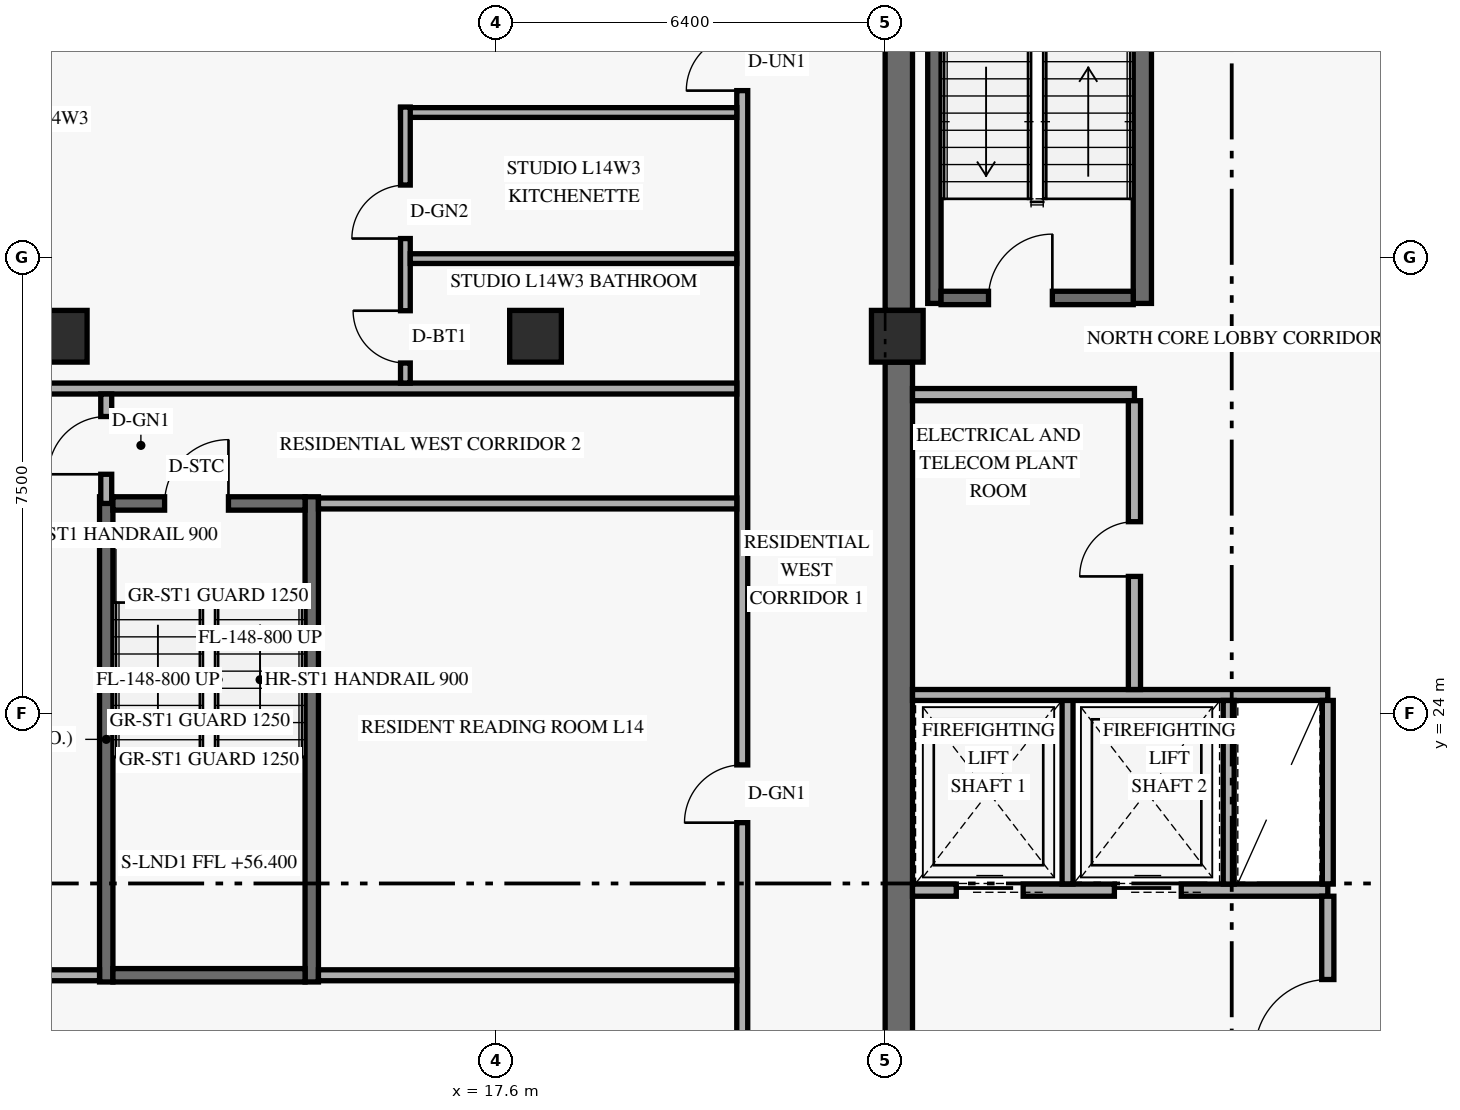
"""IFC4 building model, lengths in metres.
Left out: names, types, materials, properties, quantities, classifications, styles, units other than length and angle.
Written with IfcOpenShell. Run it as: python <this file> out.ifc"""

import sys

from ifc_helpers import new_model, si_unit, direction, frame, frame_2d, origin, origin_2d, place, context, subcontext, project, spatial, rectangle, extrude, element, fill, save


model = new_model("IFC4")
c1 = context("Model", 3, precision=1e-05, world=origin(), true_north=direction((0.0, 1.0)))
c2 = subcontext(c1, "Body", "Model", "MODEL_VIEW")
j1 = project(units=[si_unit("LENGTHUNIT", "METRE"), si_unit("PLANEANGLEUNIT", "RADIAN")], contexts=[c1])
p1 = place(None, origin())
s1 = spatial("IfcSite", under=j1, at=p1, CompositionType="ELEMENT")
p2 = place(p1, origin())
s2 = spatial("IfcBuilding", under=s1, at=p2, CompositionType="ELEMENT")
p3 = place(p2, frame((0.0, 0.0, 56.4)))
s3 = spatial("IfcBuildingStorey", under=s2, at=p3, CompositionType="ELEMENT", Elevation=56.4)
p4 = place(p3, frame((24.225, 17.975, 0.0), z_axis=(0.0, 0.0, 1.0), x_axis=(0.0, 1.0, 0.0)))
e1 = element("IfcWall", 1, at=p4, inside=s3, PredefinedType="SHEAR", context=c2, shape_type="SweptSolid", body=[
    extrude(rectangle(XDim=11.8, YDim=0.45, at=frame_2d((5.9, 0.0))), origin(), (0.0, 0.0, 1.0), 2.657),
])
p5 = place(p3, frame((24.225, 30.625, 0.0), z_axis=(0.0, 0.0, 1.0), x_axis=(0.0, 1.0, 0.0)))
e2 = element("IfcWall", 2, at=p5, inside=s3, PredefinedType="SHEAR", context=c2, shape_type="SweptSolid", body=[
    extrude(rectangle(XDim=7.7, YDim=0.45, at=frame_2d((3.85, 0.0))), origin(), (0.0, 0.0, 1.0), 2.657),
])
p6 = place(p3, frame((24.81, 30.74, 0.0), z_axis=(0.0, 0.0, 1.0), x_axis=(0.0, 1.0, 0.0)))
e3 = element("IfcWall", 3, at=p6, inside=s3, PredefinedType="SHEAR", context=c2, shape_type="SweptSolid", body=[
    extrude(rectangle(XDim=7.76, YDim=0.22, at=frame_2d((3.88, 0.0))), origin(), (0.0, 0.0, 1.0), 3.35),
])
p7 = place(p3, frame((28.23, 30.74, 0.0), z_axis=(0.0, 0.0, 1.0), x_axis=(0.0, 1.0, 0.0)))
e4 = element("IfcWall", 4, at=p7, inside=s3, PredefinedType="SHEAR", context=c2, shape_type="SweptSolid", body=[
    extrude(rectangle(XDim=7.76, YDim=0.3, at=frame_2d((3.88, 0.0))), origin(), (0.0, 0.0, 1.0), 3.35),
])
p8 = place(p3, frame((24.92, 30.83, 0.0), z_axis=(0.0, 0.0, 1.0), x_axis=(1.0, 0.0, 0.0)))
e5 = element("IfcWall", 5, at=p8, inside=s3, PredefinedType="SHEAR", context=c2, shape_type="SweptSolid", body=[
    extrude(rectangle(XDim=3.16, YDim=0.22, at=frame_2d((1.58, 0.0))), origin(), (0.0, 0.0, 1.0), 3.35),
])
p9 = place(p8, frame((0.78, 0.0, 0.0)))
e6 = element("IfcOpeningElement", 6, at=p9, cuts=e5, PredefinedType="OPENING", context=c2, shape_type="SweptSolid", body=[
    extrude(rectangle(XDim=1.05, YDim=2.15, at=frame_2d((0.525, 1.075))), frame((0.0, 0.12, 0.0), z_axis=(0.0, -1.0, 0.0), x_axis=(1.0, 0.0, 0.0)), (0.0, 0.0, 1.0), 0.24),
])
for number, where, z_axis, x_axis in (
    (7, (11.19, 19.58, 0.0), (0.0, 0.0, 1.0), (0.0, 1.0, 0.0)),
    (8, (14.57, 19.58, 0.0), (0.0, 0.0, 1.0), (0.0, 1.0, 0.0)),
):
    element("IfcWall", number, at=place(p3, frame(where, z_axis=z_axis, x_axis=x_axis)), inside=s3, PredefinedType="SHEAR", context=c2, shape_type="SweptSolid", body=[
        extrude(rectangle(XDim=7.98, YDim=0.22, at=frame_2d((3.99, 0.0))), origin(), (0.0, 0.0, 1.0), 2.657),
    ])
p10 = place(p3, frame((11.3, 19.69, 0.0), z_axis=(0.0, 0.0, 1.0), x_axis=(1.0, 0.0, 0.0)))
e9 = element("IfcWall", 9, at=p10, inside=s3, PredefinedType="SHEAR", context=c2, shape_type="SweptSolid", body=[
    extrude(rectangle(XDim=3.16, YDim=0.22, at=frame_2d((1.58, 0.0))), origin(), (0.0, 0.0, 1.0), 2.657),
])
p11 = place(p3, frame((11.3, 27.45, 0.0), z_axis=(0.0, 0.0, 1.0), x_axis=(1.0, 0.0, 0.0)))
e10 = element("IfcWall", 10, at=p11, inside=s3, PredefinedType="SHEAR", context=c2, shape_type="SweptSolid", body=[
    extrude(rectangle(XDim=3.16, YDim=0.22, at=frame_2d((1.58, 0.0))), origin(), (0.0, 0.0, 1.0), 2.657),
])
p12 = place(p11, frame((0.85, 0.0, 0.0)))
e11 = element("IfcOpeningElement", 11, at=p12, cuts=e10, PredefinedType="OPENING", context=c2, shape_type="SweptSolid", body=[
    extrude(rectangle(XDim=1.05, YDim=2.15, at=frame_2d((0.525, 1.075))), frame((0.0, 0.12, 0.0), z_axis=(0.0, -1.0, 0.0), x_axis=(1.0, 0.0, 0.0)), (0.0, 0.0, 1.0), 0.24),
])
for number, where, z_axis, x_axis in (
    (12, (10.45, 30.2, 0.0), (0.0, 0.0, 1.0), (1.0, 0.0, 0.0)),
    (13, (18.25, 30.2, 0.0), (0.0, 0.0, 1.0), (1.0, 0.0, 0.0)),
    (14, (24.2, 30.2, 0.0), (0.0, 0.0, 1.0), (1.0, 0.0, 0.0)),
):
    element("IfcColumn", number, at=place(p3, frame(where, z_axis=z_axis, x_axis=x_axis)), inside=s3, PredefinedType="COLUMN", context=c2, shape_type="SweptSolid", body=[
        extrude(rectangle(XDim=0.85, YDim=0.85, at=origin_2d()), origin(), (0.0, 0.0, 1.0), 3.6),
    ])
p13 = place(p3, frame((24.45, 21.09, 0.0), z_axis=(0.0, 0.0, 1.0), x_axis=(1.0, 0.0, 0.0)))
e15 = element("IfcWall", 15, at=p13, inside=s3, PredefinedType="STANDARD", context=c2, shape_type="SweptSolid", body=[
    extrude(rectangle(XDim=6.83, YDim=0.2, at=frame_2d((3.415, 0.0))), origin(), (0.0, 0.0, 1.0), 3.35),
])
p14 = place(p13, frame((0.72, 0.0, 0.0)))
e16 = element("IfcOpeningElement", 16, at=p14, cuts=e15, PredefinedType="OPENING", context=c2, shape_type="SweptSolid", body=[
    extrude(rectangle(XDim=1.1, YDim=2.2, at=frame_2d((0.55, 1.1))), frame((0.0, 0.11, 0.0), z_axis=(0.0, -1.0, 0.0), x_axis=(1.0, 0.0, 0.0)), (0.0, 0.0, 1.0), 0.22),
])
p15 = place(p13, frame((3.32, 0.0, 0.0)))
e17 = element("IfcOpeningElement", 17, at=p15, cuts=e15, PredefinedType="OPENING", context=c2, shape_type="SweptSolid", body=[
    extrude(rectangle(XDim=1.1, YDim=2.2, at=frame_2d((0.55, 1.1))), frame((0.0, 0.11, 0.0), z_axis=(0.0, -1.0, 0.0), x_axis=(1.0, 0.0, 0.0)), (0.0, 0.0, 1.0), 0.22),
])
p16 = place(p3, frame((31.28, 17.07, 0.0), z_axis=(0.0, 0.0, 1.0), x_axis=(0.0, 1.0, 0.0)))
e18 = element("IfcWall", 18, at=p16, inside=s3, PredefinedType="STANDARD", context=c2, shape_type="SweptSolid", body=[
    extrude(rectangle(XDim=3.92, YDim=0.2, at=frame_2d((1.96, 0.0))), origin(), (0.0, 0.0, 1.0), 2.639),
])
p17 = place(p16, frame((1.35, 0.0, 0.0)))
e19 = element("IfcOpeningElement", 19, at=p17, cuts=e18, PredefinedType="OPENING", context=c2, shape_type="SweptSolid", body=[
    extrude(rectangle(XDim=1.2, YDim=2.15, at=frame_2d((0.6, 1.075))), frame((0.0, 0.11, 0.0), z_axis=(0.0, -1.0, 0.0), x_axis=(1.0, 0.0, 0.0)), (0.0, 0.0, 1.0), 0.22),
])
p18 = place(p3, frame((27.0, 21.19, 0.0), z_axis=(0.0, 0.0, 1.0), x_axis=(0.0, 1.0, 0.0)))
e20 = element("IfcWall", 20, at=p18, inside=s3, PredefinedType="STANDARD", context=c2, shape_type="SweptSolid", body=[
    extrude(rectangle(XDim=3.11, YDim=0.18, at=frame_2d((1.555, 0.0))), origin(), (0.0, 0.0, 1.0), 3.35),
])
p19 = place(p3, frame((24.45, 24.3, 0.0), z_axis=(0.0, 0.0, 1.0), x_axis=(1.0, 0.0, 0.0)))
e21 = element("IfcWall", 21, at=p19, inside=s3, PredefinedType="STANDARD", context=c2, shape_type="SweptSolid", body=[
    extrude(rectangle(XDim=6.83, YDim=0.18, at=frame_2d((3.415, 0.0))), origin(), (0.0, 0.0, 1.0), 3.35),
])
for number, where, z_axis, x_axis in (
    (22, (29.65, 21.19, 0.0), (0.0, 0.0, 1.0), (0.0, 1.0, 0.0)),
    (23, (31.28, 21.19, 0.0), (0.0, 0.0, 1.0), (0.0, 1.0, 0.0)),
):
    element("IfcWall", number, at=place(p3, frame(where, z_axis=z_axis, x_axis=x_axis)), inside=s3, PredefinedType="STANDARD", context=c2, shape_type="SweptSolid", body=[
        extrude(rectangle(XDim=3.02, YDim=0.18, at=frame_2d((1.51, 0.0))), origin(), (0.0, 0.0, 1.0), 3.35),
    ])
p20 = place(p3, frame((24.45, 29.24, 0.0), z_axis=(0.0, 0.0, 1.0), x_axis=(1.0, 0.0, 0.0)))
e24 = element("IfcWall", 24, at=p20, inside=s3, PredefinedType="STANDARD", context=c2, shape_type="SweptSolid", body=[
    extrude(rectangle(XDim=3.65, YDim=0.2, at=frame_2d((1.825, 0.0))), origin(), (0.0, 0.0, 1.0), 3.35),
])
p21 = place(p3, frame((28.1, 24.39, 0.0), z_axis=(0.0, 0.0, 1.0), x_axis=(0.0, 1.0, 0.0)))
e25 = element("IfcWall", 25, at=p21, inside=s3, PredefinedType="STANDARD", context=c2, shape_type="SweptSolid", body=[
    extrude(rectangle(XDim=4.75, YDim=0.2, at=frame_2d((2.375, 0.0))), origin(), (0.0, 0.0, 1.0), 3.35),
])
p22 = place(p21, frame((1.86, 0.0, 0.0)))
e26 = element("IfcOpeningElement", 26, at=p22, cuts=e25, PredefinedType="OPENING", context=c2, shape_type="SweptSolid", body=[
    extrude(rectangle(XDim=0.9, YDim=2.1, at=frame_2d((0.45, 1.05))), frame((0.0, 0.11, 0.0), z_axis=(0.0, -1.0, 0.0), x_axis=(1.0, 0.0, 0.0)), (0.0, 0.0, 1.0), 0.22),
])
p23 = place(p3, frame((21.65, 1.29, 0.0), z_axis=(0.0, 0.0, 1.0), x_axis=(0.0, 1.0, 0.0)))
e27 = element("IfcWall", 27, at=p23, inside=s3, PredefinedType="STANDARD", context=c2, shape_type="SweptSolid", body=[
    extrude(rectangle(XDim=45.42, YDim=0.18, at=frame_2d((22.71, 0.0))), origin(), (0.0, 0.0, 1.0), 2.639),
])
p24 = place(p23, frame((3.135, 0.0, 0.0)))
e28 = element("IfcOpeningElement", 28, at=p24, cuts=e27, PredefinedType="OPENING", context=c2, shape_type="SweptSolid", body=[
    extrude(rectangle(XDim=0.92, YDim=2.15, at=frame_2d((0.46, 1.075))), frame((0.0, 0.1, 0.0), z_axis=(0.0, -1.0, 0.0), x_axis=(1.0, 0.0, 0.0)), (0.0, 0.0, 1.0), 0.2),
])
p25 = place(p23, frame((13.975, 0.0, 0.0)))
e29 = element("IfcOpeningElement", 29, at=p25, cuts=e27, PredefinedType="OPENING", context=c2, shape_type="SweptSolid", body=[
    extrude(rectangle(XDim=0.92, YDim=2.15, at=frame_2d((0.46, 1.075))), frame((0.0, 0.1, 0.0), z_axis=(0.0, -1.0, 0.0), x_axis=(1.0, 0.0, 0.0)), (0.0, 0.0, 1.0), 0.2),
])
p26 = place(p23, frame((20.91, 0.0, 0.0)))
e30 = element("IfcOpeningElement", 30, at=p26, cuts=e27, PredefinedType="OPENING", context=c2, shape_type="SweptSolid", body=[
    extrude(rectangle(XDim=0.95, YDim=2.15, at=frame_2d((0.475, 1.075))), frame((0.0, 0.1, 0.0), z_axis=(0.0, -1.0, 0.0), x_axis=(1.0, 0.0, 0.0)), (0.0, 0.0, 1.0), 0.2),
])
p27 = place(p23, frame((32.95, 0.0, 0.0)))
e31 = element("IfcOpeningElement", 31, at=p27, cuts=e27, PredefinedType="OPENING", context=c2, shape_type="SweptSolid", body=[
    extrude(rectangle(XDim=0.92, YDim=2.15, at=frame_2d((0.46, 1.075))), frame((0.0, 0.1, 0.0), z_axis=(0.0, -1.0, 0.0), x_axis=(1.0, 0.0, 0.0)), (0.0, 0.0, 1.0), 0.2),
])
p28 = place(p23, frame((41.85, 0.0, 0.0)))
e32 = element("IfcOpeningElement", 32, at=p28, cuts=e27, PredefinedType="OPENING", context=c2, shape_type="SweptSolid", body=[
    extrude(rectangle(XDim=0.92, YDim=2.15, at=frame_2d((0.46, 1.075))), frame((0.0, 0.1, 0.0), z_axis=(0.0, -1.0, 0.0), x_axis=(1.0, 0.0, 0.0)), (0.0, 0.0, 1.0), 0.2),
])
p29 = place(p3, frame((14.68, 27.45, 0.0), z_axis=(0.0, 0.0, 1.0), x_axis=(1.0, 0.0, 0.0)))
e33 = element("IfcWall", 33, at=p29, inside=s3, PredefinedType="STANDARD", context=c2, shape_type="SweptSolid", body=[
    extrude(rectangle(XDim=6.88, YDim=0.18, at=frame_2d((3.44, 0.0))), origin(), (0.0, 0.0, 1.0), 2.639),
])
p30 = place(p3, frame((2.09, 29.34, 0.0), z_axis=(0.0, 0.0, 1.0), x_axis=(1.0, 0.0, 0.0)))
e34 = element("IfcWall", 34, at=p30, inside=s3, PredefinedType="STANDARD", context=c2, shape_type="SweptSolid", body=[
    extrude(rectangle(XDim=19.47, YDim=0.18, at=frame_2d((9.735, 0.0))), origin(), (0.0, 0.0, 1.0), 2.639),
])
p31 = place(p3, frame((11.19, 27.45, 0.0), z_axis=(0.0, 0.0, 1.0), x_axis=(0.0, 1.0, 0.0)))
e35 = element("IfcWall", 35, at=p31, inside=s3, PredefinedType="STANDARD", context=c2, shape_type="SweptSolid", body=[
    extrude(rectangle(XDim=1.8, YDim=0.18, at=frame_2d((0.9, 0.0))), origin(), (0.0, 0.0, 1.0), 2.639),
])
p32 = place(p31, frame((0.48, 0.0, 0.0)))
e36 = element("IfcOpeningElement", 36, at=p32, cuts=e35, PredefinedType="OPENING", context=c2, shape_type="SweptSolid", body=[
    extrude(rectangle(XDim=0.95, YDim=2.15, at=frame_2d((0.475, 1.075))), frame((0.0, 0.1, 0.0), z_axis=(0.0, -1.0, 0.0), x_axis=(1.0, 0.0, 0.0)), (0.0, 0.0, 1.0), 0.2),
])
p33 = place(p3, frame((2.09, 19.69, 0.0), z_axis=(0.0, 0.0, 1.0), x_axis=(1.0, 0.0, 0.0)))
e37 = element("IfcWall", 37, at=p33, inside=s3, PredefinedType="PARTITIONING", context=c2, shape_type="SweptSolid", body=[
    extrude(rectangle(XDim=8.99, YDim=0.18, at=frame_2d((4.495, 0.0))), origin(), (0.0, 0.0, 1.0), 2.639),
])
p34 = place(p3, frame((14.68, 19.69, 0.0), z_axis=(0.0, 0.0, 1.0), x_axis=(1.0, 0.0, 0.0)))
e38 = element("IfcWall", 38, at=p34, inside=s3, PredefinedType="PARTITIONING", context=c2, shape_type="SweptSolid", body=[
    extrude(rectangle(XDim=6.88, YDim=0.18, at=frame_2d((3.44, 0.0))), origin(), (0.0, 0.0, 1.0), 2.639),
])
p35 = place(p3, frame((16.03, 33.88, 0.0), z_axis=(0.0, 0.0, 1.0), x_axis=(1.0, 0.0, 0.0)))
e39 = element("IfcWall", 39, at=p35, inside=s3, PredefinedType="PLUMBINGWALL", context=c2, shape_type="SweptSolid", body=[
    extrude(rectangle(XDim=5.53, YDim=0.16, at=frame_2d((2.765, 0.0))), origin(), (0.0, 0.0, 1.0), 2.639),
])
p36 = place(p3, frame((16.11, 29.43, 0.0), z_axis=(0.0, 0.0, 1.0), x_axis=(0.0, 1.0, 0.0)))
e40 = element("IfcWall", 40, at=p36, inside=s3, PredefinedType="PLUMBINGWALL", context=c2, shape_type="SweptSolid", body=[
    extrude(rectangle(XDim=4.54, YDim=0.16, at=frame_2d((2.27, 0.0))), origin(), (0.0, 0.0, 1.0), 2.639),
])
p37 = place(p36, frame((0.33, 0.0, 0.0)))
e41 = element("IfcOpeningElement", 41, at=p37, cuts=e40, PredefinedType="OPENING", context=c2, shape_type="SweptSolid", body=[
    extrude(rectangle(XDim=0.86, YDim=2.12, at=frame_2d((0.43, 1.06))), frame((0.0, 0.09, 0.0), z_axis=(0.0, -1.0, 0.0), x_axis=(1.0, 0.0, 0.0)), (0.0, 0.0, 1.0), 0.18),
])
p38 = place(p36, frame((2.377, 0.0, 0.0)))
e42 = element("IfcOpeningElement", 42, at=p38, cuts=e40, PredefinedType="OPENING", context=c2, shape_type="SweptSolid", body=[
    extrude(rectangle(XDim=0.88, YDim=2.12, at=frame_2d((0.44, 1.06))), frame((0.0, 0.09, 0.0), z_axis=(0.0, -1.0, 0.0), x_axis=(1.0, 0.0, 0.0)), (0.0, 0.0, 1.0), 0.18),
])
p39 = place(p3, frame((16.19, 31.477, 0.0), z_axis=(0.0, 0.0, 1.0), x_axis=(1.0, 0.0, 0.0)))
e43 = element("IfcWall", 43, at=p39, inside=s3, PredefinedType="PLUMBINGWALL", context=c2, shape_type="SweptSolid", body=[
    extrude(rectangle(XDim=5.37, YDim=0.16, at=frame_2d((2.685, 0.0))), origin(), (0.0, 0.0, 1.0), 2.639),
])
p40 = place(p9, origin())
e44 = element("IfcDoor", 44, at=p40, inside=s3, OperationType="SINGLE_SWING_RIGHT", PredefinedType="DOOR", context=c2, shape_type="SweptSolid", body=[
    extrude(rectangle(XDim=1.05, YDim=2.15, at=frame_2d((0.525, 1.075))), frame((0.0, 0.025, 0.0), z_axis=(0.0, -1.0, 0.0), x_axis=(1.0, 0.0, 0.0)), (0.0, 0.0, 1.0), 0.05),
])
fill(e6, e44)
p41 = place(p14, origin())
e45 = element("IfcDoor", 45, at=p41, inside=s3, OperationType="SLIDING_TO_LEFT", PredefinedType="DOOR", context=c2, shape_type="SweptSolid", body=[
    extrude(rectangle(XDim=1.1, YDim=2.2, at=frame_2d((0.55, 1.1))), frame((0.0, 0.025, 0.0), z_axis=(0.0, -1.0, 0.0), x_axis=(1.0, 0.0, 0.0)), (0.0, 0.0, 1.0), 0.05),
])
fill(e16, e45)
p42 = place(p15, origin())
e46 = element("IfcDoor", 46, at=p42, inside=s3, OperationType="SLIDING_TO_LEFT", PredefinedType="DOOR", context=c2, shape_type="SweptSolid", body=[
    extrude(rectangle(XDim=1.1, YDim=2.2, at=frame_2d((0.55, 1.1))), frame((0.0, 0.025, 0.0), z_axis=(0.0, -1.0, 0.0), x_axis=(1.0, 0.0, 0.0)), (0.0, 0.0, 1.0), 0.05),
])
fill(e17, e46)
p43 = place(p17, origin())
e47 = element("IfcDoor", 47, at=p43, inside=s3, OperationType="SINGLE_SWING_LEFT", PredefinedType="DOOR", context=c2, shape_type="SweptSolid", body=[
    extrude(rectangle(XDim=1.2, YDim=2.15, at=frame_2d((0.6, 1.075))), frame((0.0, 0.025, 0.0), z_axis=(0.0, -1.0, 0.0), x_axis=(1.0, 0.0, 0.0)), (0.0, 0.0, 1.0), 0.05),
])
fill(e19, e47)
p44 = place(p22, origin())
e48 = element("IfcDoor", 48, at=p44, inside=s3, OperationType="SINGLE_SWING_LEFT", PredefinedType="DOOR", context=c2, shape_type="SweptSolid", body=[
    extrude(rectangle(XDim=0.9, YDim=2.1, at=frame_2d((0.45, 1.05))), frame((0.0, 0.025, 0.0), z_axis=(0.0, -1.0, 0.0), x_axis=(1.0, 0.0, 0.0)), (0.0, 0.0, 1.0), 0.05),
])
fill(e26, e48)
p45 = place(p12, frame((1.05, 0.0, 0.0), z_axis=(0.0, 0.0, 1.0), x_axis=(-1.0, 0.0, 0.0)))
e49 = element("IfcDoor", 49, at=p45, inside=s3, OperationType="SINGLE_SWING_LEFT", PredefinedType="DOOR", context=c2, shape_type="SweptSolid", body=[
    extrude(rectangle(XDim=1.05, YDim=2.15, at=frame_2d((0.525, 1.075))), frame((0.0, 0.025, 0.0), z_axis=(0.0, -1.0, 0.0), x_axis=(1.0, 0.0, 0.0)), (0.0, 0.0, 1.0), 0.05),
])
fill(e11, e49)
p46 = place(p32, origin())
e50 = element("IfcDoor", 50, at=p46, inside=s3, OperationType="SINGLE_SWING_LEFT", PredefinedType="DOOR", context=c2, shape_type="SweptSolid", body=[
    extrude(rectangle(XDim=0.95, YDim=2.15, at=frame_2d((0.475, 1.075))), frame((0.0, 0.025, 0.0), z_axis=(0.0, -1.0, 0.0), x_axis=(1.0, 0.0, 0.0)), (0.0, 0.0, 1.0), 0.05),
])
fill(e36, e50)
p47 = place(p26, origin())
e51 = element("IfcDoor", 51, at=p47, inside=s3, OperationType="SINGLE_SWING_LEFT", PredefinedType="DOOR", context=c2, shape_type="SweptSolid", body=[
    extrude(rectangle(XDim=0.95, YDim=2.15, at=frame_2d((0.475, 1.075))), frame((0.0, 0.025, 0.0), z_axis=(0.0, -1.0, 0.0), x_axis=(1.0, 0.0, 0.0)), (0.0, 0.0, 1.0), 0.05),
])
fill(e30, e51)
p48 = place(p27, origin())
e52 = element("IfcDoor", 52, at=p48, inside=s3, OperationType="SINGLE_SWING_LEFT", PredefinedType="DOOR", context=c2, shape_type="SweptSolid", body=[
    extrude(rectangle(XDim=0.92, YDim=2.15, at=frame_2d((0.46, 1.075))), frame((0.0, 0.025, 0.0), z_axis=(0.0, -1.0, 0.0), x_axis=(1.0, 0.0, 0.0)), (0.0, 0.0, 1.0), 0.05),
])
fill(e31, e52)
p49 = place(p37, origin())
e53 = element("IfcDoor", 53, at=p49, inside=s3, OperationType="SINGLE_SWING_RIGHT", PredefinedType="DOOR", context=c2, shape_type="SweptSolid", body=[
    extrude(rectangle(XDim=0.86, YDim=2.12, at=frame_2d((0.43, 1.06))), frame((0.0, 0.025, 0.0), z_axis=(0.0, -1.0, 0.0), x_axis=(1.0, 0.0, 0.0)), (0.0, 0.0, 1.0), 0.05),
])
fill(e41, e53)
p50 = place(p38, origin())
e54 = element("IfcDoor", 54, at=p50, inside=s3, OperationType="SINGLE_SWING_LEFT", PredefinedType="DOOR", context=c2, shape_type="SweptSolid", body=[
    extrude(rectangle(XDim=0.88, YDim=2.12, at=frame_2d((0.44, 1.06))), frame((0.0, 0.025, 0.0), z_axis=(0.0, -1.0, 0.0), x_axis=(1.0, 0.0, 0.0)), (0.0, 0.0, 1.0), 0.05),
])
fill(e42, e54)
save(model, sys.argv[1])
